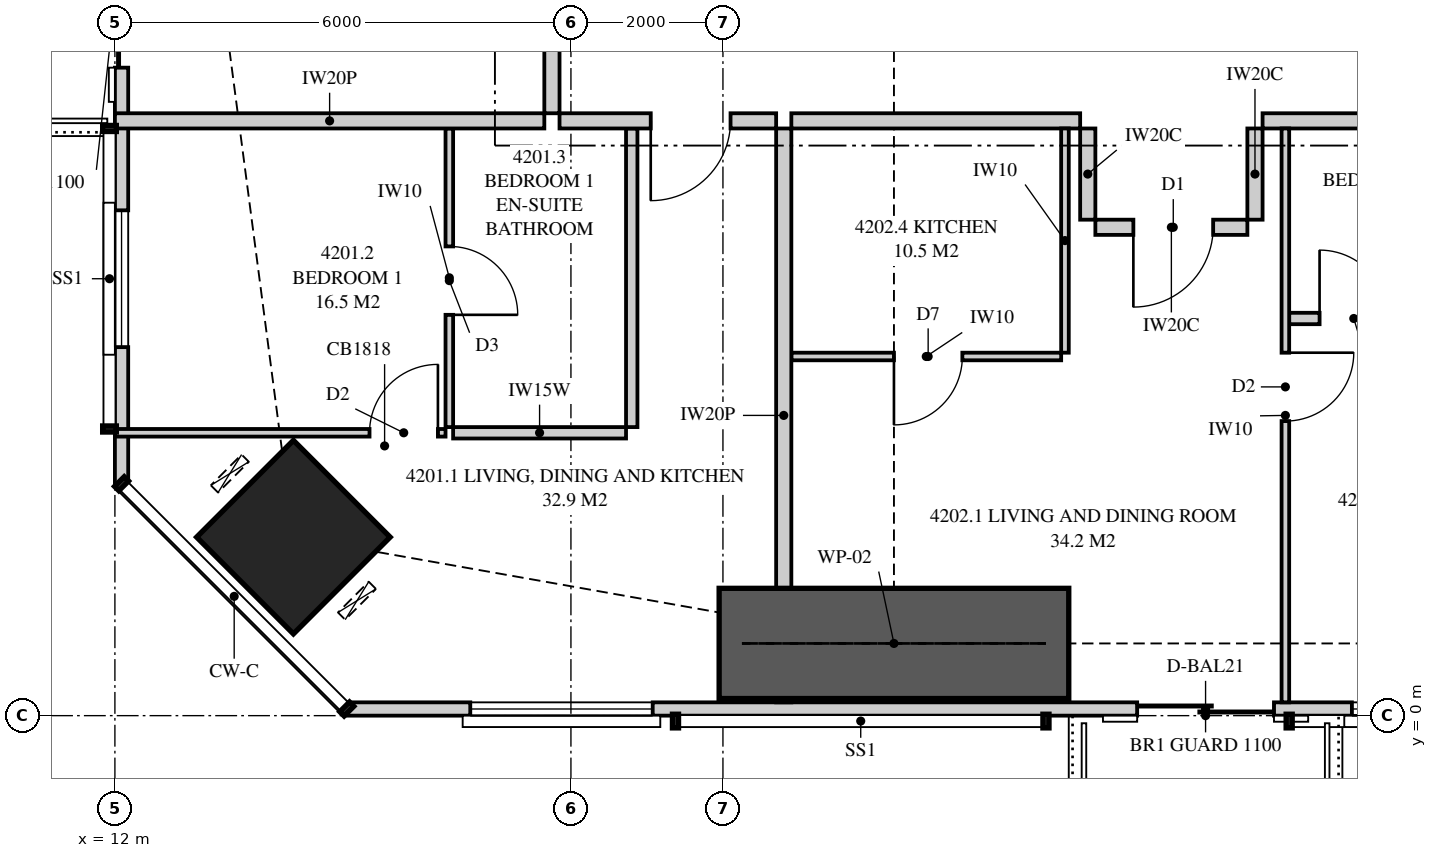
"""IFC4 building model, lengths in metres.
Left out: names, types, materials, properties, quantities, classifications, styles, units other than length and angle.
Written with IfcOpenShell. Run it as: python <this file> out.ifc"""

import sys

from ifc_helpers import new_model, si_unit, direction, frame, frame_2d, origin, origin_2d, place, context, subcontext, project, spatial, polyline, rectangle, hollow_rectangle, outline, extrude, element, fill, save


model = new_model("IFC4")
c1 = context("Model", 3, precision=1e-05, world=origin(), true_north=direction((0.0, 1.0)))
c2 = subcontext(c1, "Body", "Model", "MODEL_VIEW")
j1 = project(units=[si_unit("LENGTHUNIT", "METRE"), si_unit("PLANEANGLEUNIT", "RADIAN")], contexts=[c1])
p1 = place(None, origin())
s1 = spatial("IfcSite", under=j1, at=p1, CompositionType="ELEMENT")
p2 = place(p1, origin())
s2 = spatial("IfcBuilding", under=s1, at=p2, CompositionType="ELEMENT")
p3 = place(p2, frame((0.0, 0.0, 157.7)))
s3 = spatial("IfcBuildingStorey", under=s2, at=p3, CompositionType="ELEMENT", Elevation=157.7)
p4 = place(p3, frame((14.348, 2.348, 0.0), z_axis=(0.0, 0.0, 1.0), x_axis=(0.707106781187, 0.707106781187, 0.0)))
e1 = element("IfcColumn", 1, at=p4, inside=s3, PredefinedType="COLUMN", context=c2, shape_type="SweptSolid", body=[
    extrude(hollow_rectangle(XDim=1.8, YDim=1.8, WallThickness=0.125, at=origin_2d()), origin(), (0.0, 0.0, 1.0), 3.35),
])
p5 = place(p3, frame((15.051, 0.087, 0.0), z_axis=(0.0, 0.0, 1.0), x_axis=(1.0, 0.0, 0.0)))
e2 = element("IfcWall", 2, at=p5, inside=s3, PredefinedType="SOLIDWALL", context=c2, shape_type="SweptSolid", body=[
    extrude(outline(polyline([(0.0, 0.0), (34.897, 0.0), (34.897, 3.11), (27.91, 3.11), (27.91, 2.15), (27.836, 2.15), (27.836, 3.11), (27.699, 3.11), (27.699, 2.15), (7.199, 2.15), (7.199, 3.11), (7.062, 3.11), (7.062, 2.15), (6.987, 2.15), (6.987, 3.11), (0.0, 3.11), (0.0, 0.0)])), frame((0.0, 0.087, 0.0), z_axis=(0.0, -1.0, 0.0), x_axis=(1.0, 0.0, 0.0)), (0.0, 0.0, 1.0), 0.175),
])
p6 = place(p5, frame((1.625, 0.0, 0.4)))
e3 = element("IfcOpeningElement", 3, at=p6, cuts=e2, PredefinedType="OPENING", context=c2, shape_type="SweptSolid", body=[
    extrude(rectangle(XDim=2.4, YDim=1.7, at=frame_2d((1.2, 0.85))), frame((0.0, 0.097, 0.0), z_axis=(0.0, -1.0, 0.0), x_axis=(1.0, 0.0, 0.0)), (0.0, 0.0, 1.0), 0.195),
])
p7 = place(p5, frame((10.399, 0.0, 0.0)))
e4 = element("IfcOpeningElement", 4, at=p7, cuts=e2, PredefinedType="OPENING", context=c2, shape_type="SweptSolid", body=[
    extrude(rectangle(XDim=1.8, YDim=2.1, at=frame_2d((0.9, 1.05))), frame((0.0, 0.097, 0.0), z_axis=(0.0, -1.0, 0.0), x_axis=(1.0, 0.0, 0.0)), (0.0, 0.0, 1.0), 0.195),
])
p8 = place(p5, frame((13.224, 0.0, 0.4)))
e5 = element("IfcOpeningElement", 5, at=p8, cuts=e2, PredefinedType="OPENING", context=c2, shape_type="SweptSolid", body=[
    extrude(rectangle(XDim=1.8, YDim=1.7, at=frame_2d((0.9, 0.85))), frame((0.0, 0.097, 0.0), z_axis=(0.0, -1.0, 0.0), x_axis=(1.0, 0.0, 0.0)), (0.0, 0.0, 1.0), 0.195),
])
p9 = place(p5, frame((19.849, 0.0, 0.4)))
e6 = element("IfcOpeningElement", 6, at=p9, cuts=e2, PredefinedType="OPENING", context=c2, shape_type="SweptSolid", body=[
    extrude(rectangle(XDim=2.4, YDim=1.7, at=frame_2d((1.2, 0.85))), frame((0.0, 0.097, 0.0), z_axis=(0.0, -1.0, 0.0), x_axis=(1.0, 0.0, 0.0)), (0.0, 0.0, 1.0), 0.195),
])
p10 = place(p5, frame((22.799, 0.0, 0.0)))
e7 = element("IfcOpeningElement", 7, at=p10, cuts=e2, PredefinedType="OPENING", context=c2, shape_type="SweptSolid", body=[
    extrude(rectangle(XDim=1.8, YDim=2.1, at=frame_2d((0.9, 1.05))), frame((0.0, 0.097, 0.0), z_axis=(0.0, -1.0, 0.0), x_axis=(1.0, 0.0, 0.0)), (0.0, 0.0, 1.0), 0.195),
])
p11 = place(p5, frame((30.17, 0.0, 0.4)))
e8 = element("IfcOpeningElement", 8, at=p11, cuts=e2, PredefinedType="OPENING", context=c2, shape_type="SweptSolid", body=[
    extrude(rectangle(XDim=2.4, YDim=1.7, at=frame_2d((1.2, 0.85))), frame((0.0, 0.097, 0.0), z_axis=(0.0, -1.0, 0.0), x_axis=(1.0, 0.0, 0.0)), (0.0, 0.0, 1.0), 0.195),
])
p12 = place(p3, frame((12.087, 32.949, 0.0), z_axis=(0.0, 0.0, 1.0), x_axis=(0.0, -1.0, 0.0)))
e9 = element("IfcWall", 9, at=p12, inside=s3, PredefinedType="SOLIDWALL", context=c2, shape_type="SweptSolid", body=[
    extrude(outline(polyline([(0.0, 0.0), (29.897, 0.0), (29.897, 3.11), (20.191, 3.11), (20.191, 2.15), (20.051, 2.15), (20.051, 3.11), (19.949, 3.11), (19.949, 2.15), (7.949, 2.15), (7.949, 3.11), (7.823, 3.11), (7.823, 2.15), (7.73, 2.15), (7.73, 3.11), (0.0, 3.11), (0.0, 0.0)])), frame((0.0, 0.087, 0.0), z_axis=(0.0, -1.0, 0.0), x_axis=(1.0, 0.0, 0.0)), (0.0, 0.0, 1.0), 0.175),
])
p13 = place(p12, frame((1.297, 0.0, 0.4)))
e10 = element("IfcOpeningElement", 10, at=p13, cuts=e9, PredefinedType="OPENING", context=c2, shape_type="SweptSolid", body=[
    extrude(rectangle(XDim=1.8, YDim=1.7, at=frame_2d((0.9, 0.85))), frame((0.0, 0.097, 0.0), z_axis=(0.0, -1.0, 0.0), x_axis=(1.0, 0.0, 0.0)), (0.0, 0.0, 1.0), 0.195),
])
p14 = place(p12, frame((10.367, 0.0, 0.4)))
e11 = element("IfcOpeningElement", 11, at=p14, cuts=e9, PredefinedType="OPENING", context=c2, shape_type="SweptSolid", body=[
    extrude(rectangle(XDim=1.2, YDim=1.7, at=frame_2d((0.6, 0.85))), frame((0.0, 0.097, 0.0), z_axis=(0.0, -1.0, 0.0), x_axis=(1.0, 0.0, 0.0)), (0.0, 0.0, 1.0), 0.195),
])
p15 = place(p12, frame((15.083, 0.0, 0.4)))
e12 = element("IfcOpeningElement", 12, at=p15, cuts=e9, PredefinedType="OPENING", context=c2, shape_type="SweptSolid", body=[
    extrude(rectangle(XDim=2.4, YDim=1.7, at=frame_2d((1.2, 0.85))), frame((0.0, 0.097, 0.0), z_axis=(0.0, -1.0, 0.0), x_axis=(1.0, 0.0, 0.0)), (0.0, 0.0, 1.0), 0.195),
])
p16 = place(p12, frame((22.624, 0.0, 0.0)))
e13 = element("IfcOpeningElement", 13, at=p16, cuts=e9, PredefinedType="OPENING", context=c2, shape_type="SweptSolid", body=[
    extrude(rectangle(XDim=1.8, YDim=2.1, at=frame_2d((0.9, 1.05))), frame((0.0, 0.097, 0.0), z_axis=(0.0, -1.0, 0.0), x_axis=(1.0, 0.0, 0.0)), (0.0, 0.0, 1.0), 0.195),
])
p17 = place(p12, frame((26.301, 0.0, 0.4)))
e14 = element("IfcOpeningElement", 14, at=p17, cuts=e9, PredefinedType="OPENING", context=c2, shape_type="SweptSolid", body=[
    extrude(rectangle(XDim=1.8, YDim=1.7, at=frame_2d((0.9, 0.85))), frame((0.0, 0.097, 0.0), z_axis=(0.0, -1.0, 0.0), x_axis=(1.0, 0.0, 0.0)), (0.0, 0.0, 1.0), 0.195),
])
p18 = place(p3, frame((20.8, 0.175, 0.0), z_axis=(0.0, 0.0, 1.0), x_axis=(0.0, 1.0, 0.0)))
e15 = element("IfcWall", 15, at=p18, inside=s3, PredefinedType="PARTITIONING", context=c2, shape_type="SweptSolid", body=[
    extrude(outline(polyline([(0.107, 3.11), (0.0, 3.11), (0.0, 0.0), (0.529, 0.0), (0.529, 0.332), (1.021, 0.332), (1.021, 0.0), (7.55, 0.0), (7.55, 3.11), (1.956, 3.11), (1.956, 2.15), (1.021, 2.15), (1.021, 1.818), (0.529, 1.818), (0.529, 2.15), (0.107, 2.15), (0.107, 3.11)])), frame((0.0, 0.1, 0.0), z_axis=(0.0, -1.0, 0.0), x_axis=(1.0, 0.0, 0.0)), (0.0, 0.0, 1.0), 0.2),
])
p19 = place(p3, frame((17.85, 7.825, 0.0), z_axis=(0.0, 0.0, 1.0), x_axis=(1.0, 0.0, 0.0)))
e16 = element("IfcWall", 16, at=p19, inside=s3, PredefinedType="PARTITIONING", context=c2, shape_type="SweptSolid", body=[
    extrude(rectangle(XDim=2.85, YDim=0.2, at=frame_2d((1.425, 0.0))), origin(), (0.0, 0.0, 1.0), 3.11),
])
p20 = place(p19, frame((1.2, 0.0, 0.0)))
e17 = element("IfcOpeningElement", 17, at=p20, cuts=e16, PredefinedType="OPENING", context=c2, shape_type="SweptSolid", body=[
    extrude(rectangle(XDim=1.05, YDim=2.2, at=frame_2d((0.525, 1.1))), frame((0.0, 0.11, 0.0), z_axis=(0.0, -1.0, 0.0), x_axis=(1.0, 0.0, 0.0)), (0.0, 0.0, 1.0), 0.22),
])
p21 = place(p3, frame((16.4, 3.796, 0.0), z_axis=(0.0, 0.0, 1.0), x_axis=(0.0, 1.0, 0.0)))
e18 = element("IfcWall", 18, at=p21, inside=s3, PredefinedType="PARTITIONING", context=c2, shape_type="SweptSolid", body=[
    extrude(rectangle(XDim=3.929, YDim=0.1, at=frame_2d((1.964, 0.0))), origin(), (0.0, 0.0, 1.0), 3.11),
])
p22 = place(p21, frame((1.477, 0.0, 0.0)))
e19 = element("IfcOpeningElement", 19, at=p22, cuts=e18, PredefinedType="OPENING", context=c2, shape_type="SweptSolid", body=[
    extrude(rectangle(XDim=0.9, YDim=2.1, at=frame_2d((0.45, 1.05))), frame((0.0, 0.06, 0.0), z_axis=(0.0, -1.0, 0.0), x_axis=(1.0, 0.0, 0.0)), (0.0, 0.0, 1.0), 0.12),
])
p23 = place(p3, frame((16.35, 3.721, 0.0), z_axis=(0.0, 0.0, 1.0), x_axis=(-1.0, 0.0, 0.0)))
e20 = element("IfcWall", 20, at=p23, inside=s3, PredefinedType="PARTITIONING", context=c2, shape_type="SweptSolid", body=[
    extrude(outline(polyline([(0.0, 0.0), (4.35, 0.0), (4.35, 3.11), (3.049, 3.11), (3.049, 2.15), (1.314, 2.15), (1.314, 3.11), (0.0, 3.11), (0.0, 0.0)])), frame((0.0, 0.05, 0.0), z_axis=(0.0, -1.0, 0.0), x_axis=(1.0, 0.0, 0.0)), (0.0, 0.0, 1.0), 0.1),
])
p24 = place(p23, frame((0.1, 0.0, 0.0)))
e21 = element("IfcOpeningElement", 21, at=p24, cuts=e20, PredefinedType="OPENING", context=c2, shape_type="SweptSolid", body=[
    extrude(rectangle(XDim=0.9, YDim=2.1, at=frame_2d((0.45, 1.05))), frame((0.0, 0.06, 0.0), z_axis=(0.0, -1.0, 0.0), x_axis=(1.0, 0.0, 0.0)), (0.0, 0.0, 1.0), 0.12),
])
p25 = place(p3, frame((18.725, 3.721, 0.0), z_axis=(0.0, 0.0, 1.0), x_axis=(-1.0, 0.0, 0.0)))
e22 = element("IfcWall", 22, at=p25, inside=s3, PredefinedType="PLUMBINGWALL", context=c2, shape_type="SweptSolid", body=[
    extrude(rectangle(XDim=2.275, YDim=0.15, at=frame_2d((1.138, 0.0))), origin(), (0.0, 0.0, 1.0), 3.11),
])
p26 = place(p3, frame((18.8, 3.796, 0.0), z_axis=(0.0, 0.0, 1.0), x_axis=(0.0, 1.0, 0.0)))
e23 = element("IfcWall", 23, at=p26, inside=s3, PredefinedType="PLUMBINGWALL", context=c2, shape_type="SweptSolid", body=[
    extrude(rectangle(XDim=3.929, YDim=0.15, at=frame_2d((1.964, 0.0))), origin(), (0.0, 0.0, 1.0), 3.11),
])
p27 = place(p3, frame((20.9, 7.825, 0.0), z_axis=(0.0, 0.0, 1.0), x_axis=(1.0, 0.0, 0.0)))
e24 = element("IfcWall", 24, at=p27, inside=s3, PredefinedType="PARTITIONING", context=c2, shape_type="SweptSolid", body=[
    extrude(outline(polyline([(0.0, 0.0), (3.8, 0.0), (3.8, 3.11), (1.696, 3.11), (1.696, 2.531), (1.004, 2.531), (1.004, 3.11), (0.0, 3.11), (0.0, 0.0)])), frame((0.0, 0.1, 0.0), z_axis=(0.0, -1.0, 0.0), x_axis=(1.0, 0.0, 0.0)), (0.0, 0.0, 1.0), 0.2),
])
p28 = place(p3, frame((27.4, 0.175, 0.0), z_axis=(0.0, 0.0, 1.0), x_axis=(0.0, 1.0, 0.0)))
e25 = element("IfcWall", 25, at=p28, inside=s3, PredefinedType="PARTITIONING", context=c2, shape_type="SweptSolid", body=[
    extrude(outline(polyline([(0.0, 0.0), (7.55, 0.0), (7.55, 3.11), (1.635, 3.11), (1.635, 2.15), (0.0, 2.15), (0.0, 3.11), (0.0, 0.0)])), frame((0.0, 0.05, 0.0), z_axis=(0.0, -1.0, 0.0), x_axis=(1.0, 0.0, 0.0)), (0.0, 0.0, 1.0), 0.1),
])
p29 = place(p28, frame((3.7, 0.0, 0.0)))
e26 = element("IfcOpeningElement", 26, at=p29, cuts=e25, PredefinedType="OPENING", context=c2, shape_type="SweptSolid", body=[
    extrude(rectangle(XDim=0.9, YDim=2.1, at=frame_2d((0.45, 1.05))), frame((0.0, 0.06, 0.0), z_axis=(0.0, -1.0, 0.0), x_axis=(1.0, 0.0, 0.0)), (0.0, 0.0, 1.0), 0.12),
])
p30 = place(p3, frame((27.45, 5.225, 0.0), z_axis=(0.0, 0.0, 1.0), x_axis=(1.0, 0.0, 0.0)))
e27 = element("IfcWall", 27, at=p30, inside=s3, PredefinedType="PLUMBINGWALL", context=c2, shape_type="SweptSolid", body=[
    extrude(rectangle(XDim=3.45, YDim=0.15, at=frame_2d((1.725, 0.0))), origin(), (0.0, 0.0, 1.0), 3.11),
])
p31 = place(p30, frame((0.4, 0.0, 0.0)))
e28 = element("IfcOpeningElement", 28, at=p31, cuts=e27, PredefinedType="OPENING", context=c2, shape_type="SweptSolid", body=[
    extrude(rectangle(XDim=0.9, YDim=2.1, at=frame_2d((0.45, 1.05))), frame((0.0, 0.085, 0.0), z_axis=(0.0, -1.0, 0.0), x_axis=(1.0, 0.0, 0.0)), (0.0, 0.0, 1.0), 0.17),
])
p32 = place(p3, frame((20.9, 4.725, 0.0), z_axis=(0.0, 0.0, 1.0), x_axis=(1.0, 0.0, 0.0)))
e29 = element("IfcWall", 29, at=p32, inside=s3, PredefinedType="PARTITIONING", context=c2, shape_type="SweptSolid", body=[
    extrude(outline(polyline([(0.0, 0.0), (3.55, 0.0), (3.55, 3.11), (1.646, 3.11), (1.646, 2.531), (1.054, 2.531), (1.054, 3.11), (0.0, 3.11), (0.0, 0.0)])), frame((0.0, 0.05, 0.0), z_axis=(0.0, -1.0, 0.0), x_axis=(1.0, 0.0, 0.0)), (0.0, 0.0, 1.0), 0.1),
])
p33 = place(p32, frame((1.35, 0.0, 0.0)))
e30 = element("IfcOpeningElement", 30, at=p33, cuts=e29, PredefinedType="OPENING", context=c2, shape_type="SweptSolid", body=[
    extrude(rectangle(XDim=0.9, YDim=2.1, at=frame_2d((0.45, 1.05))), frame((0.0, 0.06, 0.0), z_axis=(0.0, -1.0, 0.0), x_axis=(1.0, 0.0, 0.0)), (0.0, 0.0, 1.0), 0.12),
])
p34 = place(p3, frame((24.5, 4.775, 0.0), z_axis=(0.0, 0.0, 1.0), x_axis=(0.0, 1.0, 0.0)))
e31 = element("IfcWall", 31, at=p34, inside=s3, PredefinedType="PARTITIONING", context=c2, shape_type="SweptSolid", body=[
    extrude(rectangle(XDim=2.95, YDim=0.1, at=frame_2d((1.475, 0.0))), origin(), (0.0, 0.0, 1.0), 3.11),
])
p35 = place(p3, frame((12.0, 7.825, 0.0), z_axis=(0.0, 0.0, 1.0), x_axis=(1.0, 0.0, 0.0)))
e32 = element("IfcWall", 32, at=p35, inside=s3, PredefinedType="PARTITIONING", context=c2, shape_type="SweptSolid", body=[
    extrude(outline(polyline([(0.0, 0.0), (5.65, 0.0), (5.65, 3.11), (2.547, 3.11), (2.547, 2.15), (0.712, 2.15), (0.712, 3.11), (0.0, 3.11), (0.0, 0.0)])), frame((0.0, 0.1, 0.0), z_axis=(0.0, -1.0, 0.0), x_axis=(1.0, 0.0, 0.0)), (0.0, 0.0, 1.0), 0.2),
])
p36 = place(p3, frame((17.75, 7.925, 0.0), z_axis=(0.0, 0.0, 1.0), x_axis=(0.0, 1.0, 0.0)))
e33 = element("IfcWall", 33, at=p36, inside=s3, PredefinedType="PARTITIONING", context=c2, shape_type="SweptSolid", body=[
    extrude(outline(polyline([(0.0, 0.0), (12.275, 0.0), (12.275, 3.11), (5.421, 3.11), (5.421, 2.531), (4.729, 2.531), (4.729, 3.11), (0.0, 3.11), (0.0, 0.0)])), frame((0.0, 0.1, 0.0), z_axis=(0.0, -1.0, 0.0), x_axis=(1.0, 0.0, 0.0)), (0.0, 0.0, 1.0), 0.2),
])
p37 = place(p36, frame((10.075, 0.0, 0.0)))
e34 = element("IfcOpeningElement", 34, at=p37, cuts=e33, PredefinedType="OPENING", context=c2, shape_type="SweptSolid", body=[
    extrude(rectangle(XDim=1.05, YDim=2.2, at=frame_2d((0.525, 1.1))), frame((0.0, 0.11, 0.0), z_axis=(0.0, -1.0, 0.0), x_axis=(1.0, 0.0, 0.0)), (0.0, 0.0, 1.0), 0.22),
])
p38 = place(p3, frame((27.1, 7.825, 0.0), z_axis=(0.0, 0.0, 1.0), x_axis=(1.0, 0.0, 0.0)))
e35 = element("IfcWall", 35, at=p38, inside=s3, PredefinedType="PARTITIONING", context=c2, shape_type="SweptSolid", body=[
    extrude(rectangle(XDim=3.8, YDim=0.2, at=frame_2d((1.9, 0.0))), origin(), (0.0, 0.0, 1.0), 3.11),
])
p39 = place(p3, frame((24.9, 6.425, 0.0), z_axis=(0.0, 0.0, 1.0), x_axis=(1.0, 0.0, 0.0)))
e36 = element("IfcWall", 36, at=p39, inside=s3, PredefinedType="PARTITIONING", context=c2, shape_type="SweptSolid", body=[
    extrude(rectangle(XDim=2.0, YDim=0.2, at=frame_2d((1.0, 0.0))), origin(), (0.0, 0.0, 1.0), 3.11),
])
p40 = place(p39, frame((0.5, 0.0, 0.0)))
e37 = element("IfcOpeningElement", 37, at=p40, cuts=e36, PredefinedType="OPENING", context=c2, shape_type="SweptSolid", body=[
    extrude(rectangle(XDim=1.05, YDim=2.2, at=frame_2d((0.525, 1.1))), frame((0.0, 0.11, 0.0), z_axis=(0.0, -1.0, 0.0), x_axis=(1.0, 0.0, 0.0)), (0.0, 0.0, 1.0), 0.22),
])
for number, where, z_axis, x_axis in (
    (38, (24.8, 7.725, 0.0), (0.0, 0.0, 1.0), (0.0, -1.0, 0.0)),
    (39, (27.0, 7.725, 0.0), (0.0, 0.0, 1.0), (0.0, -1.0, 0.0)),
):
    element("IfcWall", number, at=place(p3, frame(where, z_axis=z_axis, x_axis=x_axis)), inside=s3, PredefinedType="PARTITIONING", context=c2, shape_type="SweptSolid", body=[
        extrude(rectangle(XDim=1.2, YDim=0.2, at=frame_2d((0.6, 0.0))), origin(), (0.0, 0.0, 1.0), 3.11),
    ])
p41 = place(p3, frame((19.95, 0.95, 0.0), z_axis=(0.0, 0.0, 1.0), x_axis=(1.0, 0.0, 0.0)))
e40 = element("IfcWall", 40, at=p41, inside=s3, PredefinedType="SHEAR", context=c2, shape_type="SweptSolid", body=[
    extrude(rectangle(XDim=4.6, YDim=1.45, at=frame_2d((2.3, 0.0))), origin(), (0.0, 0.0, 1.0), 3.35),
])
p42 = place(p6, origin())
e41 = element("IfcWindow", 41, at=p42, inside=s3, PartitioningType="SINGLE_PANEL", PredefinedType="WINDOW", context=c2, shape_type="SweptSolid", body=[
    extrude(rectangle(XDim=2.4, YDim=1.7, at=frame_2d((1.2, 0.85))), frame((0.0, 0.03, 0.0), z_axis=(0.0, -1.0, 0.0), x_axis=(1.0, 0.0, 0.0)), (0.0, 0.0, 1.0), 0.06),
])
fill(e3, e41)
p43 = place(p7, origin())
e42 = element("IfcDoor", 42, at=p43, inside=s3, OperationType="SLIDING_TO_LEFT", PredefinedType="DOOR", context=c2, shape_type="SweptSolid", body=[
    extrude(rectangle(XDim=1.8, YDim=2.1, at=frame_2d((0.9, 1.05))), frame((0.0, 0.025, 0.0), z_axis=(0.0, -1.0, 0.0), x_axis=(1.0, 0.0, 0.0)), (0.0, 0.0, 1.0), 0.05),
])
fill(e4, e42)
p44 = place(p8, origin())
e43 = element("IfcWindow", 43, at=p44, inside=s3, PartitioningType="SINGLE_PANEL", PredefinedType="WINDOW", context=c2, shape_type="SweptSolid", body=[
    extrude(rectangle(XDim=1.8, YDim=1.7, at=frame_2d((0.9, 0.85))), frame((0.0, 0.03, 0.0), z_axis=(0.0, -1.0, 0.0), x_axis=(1.0, 0.0, 0.0)), (0.0, 0.0, 1.0), 0.06),
])
fill(e5, e43)
p45 = place(p16, origin())
e44 = element("IfcDoor", 44, at=p45, inside=s3, OperationType="SLIDING_TO_LEFT", PredefinedType="DOOR", context=c2, shape_type="SweptSolid", body=[
    extrude(rectangle(XDim=1.8, YDim=2.1, at=frame_2d((0.9, 1.05))), frame((0.0, 0.025, 0.0), z_axis=(0.0, -1.0, 0.0), x_axis=(1.0, 0.0, 0.0)), (0.0, 0.0, 1.0), 0.05),
])
fill(e13, e44)
p46 = place(p17, origin())
e45 = element("IfcWindow", 45, at=p46, inside=s3, PartitioningType="SINGLE_PANEL", PredefinedType="WINDOW", context=c2, shape_type="SweptSolid", body=[
    extrude(rectangle(XDim=1.8, YDim=1.7, at=frame_2d((0.9, 0.85))), frame((0.0, 0.03, 0.0), z_axis=(0.0, -1.0, 0.0), x_axis=(1.0, 0.0, 0.0)), (0.0, 0.0, 1.0), 0.06),
])
fill(e14, e45)
p47 = place(p20, frame((1.05, 0.0, 0.0), z_axis=(0.0, 0.0, 1.0), x_axis=(-1.0, 0.0, 0.0)))
e46 = element("IfcDoor", 46, at=p47, inside=s3, OperationType="SINGLE_SWING_RIGHT", PredefinedType="DOOR", context=c2, shape_type="SweptSolid", body=[
    extrude(rectangle(XDim=1.05, YDim=2.2, at=frame_2d((0.525, 1.1))), frame((0.0, 0.025, 0.0), z_axis=(0.0, -1.0, 0.0), x_axis=(1.0, 0.0, 0.0)), (0.0, 0.0, 1.0), 0.05),
])
fill(e17, e46)
p48 = place(p24, frame((0.9, 0.0, 0.0), z_axis=(0.0, 0.0, 1.0), x_axis=(-1.0, 0.0, 0.0)))
e47 = element("IfcDoor", 47, at=p48, inside=s3, OperationType="SINGLE_SWING_RIGHT", PredefinedType="DOOR", context=c2, shape_type="SweptSolid", body=[
    extrude(rectangle(XDim=0.9, YDim=2.1, at=frame_2d((0.45, 1.05))), frame((0.0, 0.025, 0.0), z_axis=(0.0, -1.0, 0.0), x_axis=(1.0, 0.0, 0.0)), (0.0, 0.0, 1.0), 0.05),
])
fill(e21, e47)
p49 = place(p22, frame((0.9, 0.0, 0.0), z_axis=(0.0, 0.0, 1.0), x_axis=(-1.0, 0.0, 0.0)))
e48 = element("IfcDoor", 48, at=p49, inside=s3, OperationType="SINGLE_SWING_RIGHT", PredefinedType="DOOR", context=c2, shape_type="SweptSolid", body=[
    extrude(rectangle(XDim=0.9, YDim=2.1, at=frame_2d((0.45, 1.05))), frame((0.0, 0.025, 0.0), z_axis=(0.0, -1.0, 0.0), x_axis=(1.0, 0.0, 0.0)), (0.0, 0.0, 1.0), 0.05),
])
fill(e19, e48)
p50 = place(p40, frame((1.05, 0.0, 0.0), z_axis=(0.0, 0.0, 1.0), x_axis=(-1.0, 0.0, 0.0)))
e49 = element("IfcDoor", 49, at=p50, inside=s3, OperationType="SINGLE_SWING_RIGHT", PredefinedType="DOOR", context=c2, shape_type="SweptSolid", body=[
    extrude(rectangle(XDim=1.05, YDim=2.2, at=frame_2d((0.525, 1.1))), frame((0.0, 0.025, 0.0), z_axis=(0.0, -1.0, 0.0), x_axis=(1.0, 0.0, 0.0)), (0.0, 0.0, 1.0), 0.05),
])
fill(e37, e49)
p51 = place(p29, frame((0.9, 0.0, 0.0), z_axis=(0.0, 0.0, 1.0), x_axis=(-1.0, 0.0, 0.0)))
e50 = element("IfcDoor", 50, at=p51, inside=s3, OperationType="SINGLE_SWING_LEFT", PredefinedType="DOOR", context=c2, shape_type="SweptSolid", body=[
    extrude(rectangle(XDim=0.9, YDim=2.1, at=frame_2d((0.45, 1.05))), frame((0.0, 0.025, 0.0), z_axis=(0.0, -1.0, 0.0), x_axis=(1.0, 0.0, 0.0)), (0.0, 0.0, 1.0), 0.05),
])
fill(e26, e50)
p52 = place(p31, origin())
e51 = element("IfcDoor", 51, at=p52, inside=s3, OperationType="SINGLE_SWING_LEFT", PredefinedType="DOOR", context=c2, shape_type="SweptSolid", body=[
    extrude(rectangle(XDim=0.9, YDim=2.1, at=frame_2d((0.45, 1.05))), frame((0.0, 0.025, 0.0), z_axis=(0.0, -1.0, 0.0), x_axis=(1.0, 0.0, 0.0)), (0.0, 0.0, 1.0), 0.05),
])
fill(e28, e51)
p53 = place(p33, frame((0.9, 0.0, 0.0), z_axis=(0.0, 0.0, 1.0), x_axis=(-1.0, 0.0, 0.0)))
e52 = element("IfcDoor", 52, at=p53, inside=s3, OperationType="SINGLE_SWING_RIGHT", PredefinedType="DOOR", context=c2, shape_type="SweptSolid", body=[
    extrude(rectangle(XDim=0.9, YDim=2.1, at=frame_2d((0.45, 1.05))), frame((0.0, 0.025, 0.0), z_axis=(0.0, -1.0, 0.0), x_axis=(1.0, 0.0, 0.0)), (0.0, 0.0, 1.0), 0.05),
])
fill(e30, e52)
save(model, sys.argv[1])
